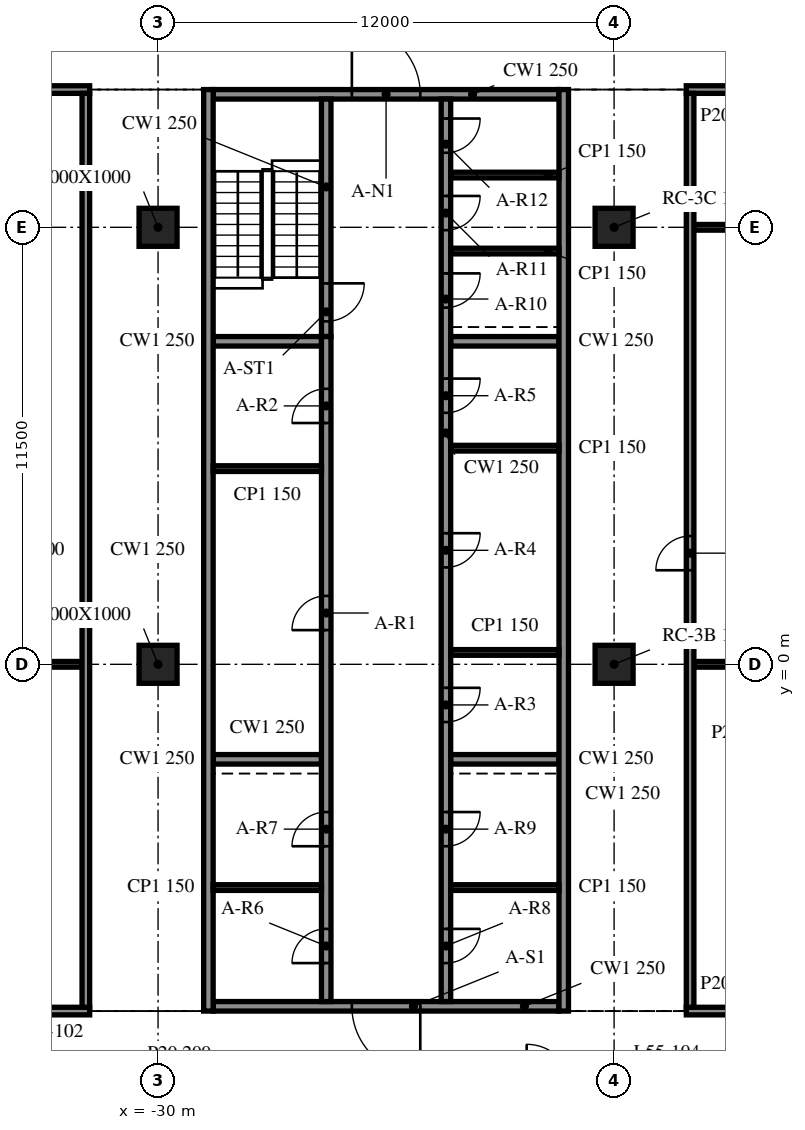
"""IFC4 building model, lengths in metres.
Left out: names, types, materials, properties, quantities, classifications, styles, units other than length and angle.
Written with IfcOpenShell. Run it as: python <this file> out.ifc"""

import sys

from ifc_helpers import new_model, si_unit, direction, frame, frame_2d, origin, origin_2d, place, context, subcontext, project, spatial, rectangle, extrude, element, fill, save


model = new_model("IFC4")
c1 = context("Model", 3, precision=1e-05, world=origin(), true_north=direction((0.0, 1.0)))
c2 = subcontext(c1, "Body", "Model", "MODEL_VIEW")
j1 = project(units=[si_unit("LENGTHUNIT", "METRE"), si_unit("PLANEANGLEUNIT", "RADIAN")], contexts=[c1])
p1 = place(None, origin())
s1 = spatial("IfcSite", under=j1, at=p1, CompositionType="ELEMENT")
p2 = place(p1, origin())
s2 = spatial("IfcBuilding", under=s1, at=p2, CompositionType="ELEMENT")
p3 = place(p2, frame((0.0, 0.0, 228.6)))
s3 = spatial("IfcBuildingStorey", under=s2, at=p3, CompositionType="ELEMENT", Elevation=228.6)
for number, where, z_axis, x_axis in (
    (1, (-30.0, 0.0, -0.34), (0.0, 0.0, 1.0), (1.0, 0.0, 0.0)),
    (2, (-30.0, 11.5, -0.34), (0.0, 0.0, 1.0), (1.0, 0.0, 0.0)),
    (3, (-18.0, 0.0, -0.34), (0.0, 0.0, 1.0), (1.0, 0.0, 0.0)),
    (4, (-18.0, 11.5, -0.34), (0.0, 0.0, 1.0), (1.0, 0.0, 0.0)),
):
    element("IfcColumn", number, at=place(p3, frame(where, z_axis=z_axis, x_axis=x_axis)), inside=s3, PredefinedType="COLUMN", context=c2, shape_type="SweptSolid", body=[
        extrude(rectangle(XDim=1.0, YDim=1.0, at=origin_2d()), origin(), (0.0, 0.0, 1.0), 3.8),
    ])
for number, where, z_axis, x_axis in (
    (5, (-28.675, 15.125, 0.0), (0.0, 0.0, 1.0), (0.0, -1.0, 0.0)),
    (6, (-19.325, -9.125, 0.0), (0.0, 0.0, 1.0), (0.0, 1.0, 0.0)),
):
    element("IfcWall", number, at=place(p3, frame(where, z_axis=z_axis, x_axis=x_axis)), inside=s3, PredefinedType="SOLIDWALL", context=c2, shape_type="SweptSolid", body=[
        extrude(rectangle(XDim=24.25, YDim=0.25, at=frame_2d((12.125, 0.0))), origin(), (0.0, 0.0, 1.0), 3.46),
    ])
p4 = place(p3, frame((-19.45, -9.0, 0.0), z_axis=(0.0, 0.0, 1.0), x_axis=(-1.0, 0.0, 0.0)))
e7 = element("IfcWall", 7, at=p4, inside=s3, PredefinedType="SOLIDWALL", context=c2, shape_type="SweptSolid", body=[
    extrude(rectangle(XDim=9.1, YDim=0.25, at=frame_2d((4.55, 0.0))), origin(), (0.0, 0.0, 1.0), 3.46),
])
p5 = place(p4, frame((3.65, 0.0, 0.0)))
e8 = element("IfcOpeningElement", 8, at=p5, cuts=e7, PredefinedType="OPENING", context=c2, shape_type="SweptSolid", body=[
    extrude(rectangle(XDim=1.8, YDim=2.1, at=frame_2d((0.9, 1.05))), frame((0.0, 0.135, 0.0), z_axis=(0.0, -1.0, 0.0), x_axis=(1.0, 0.0, 0.0)), (0.0, 0.0, 1.0), 0.27),
])
p6 = place(p3, frame((-28.55, 15.0, 0.0), z_axis=(0.0, 0.0, 1.0), x_axis=(1.0, 0.0, 0.0)))
e9 = element("IfcWall", 9, at=p6, inside=s3, PredefinedType="SOLIDWALL", context=c2, shape_type="SweptSolid", body=[
    extrude(rectangle(XDim=9.1, YDim=0.25, at=frame_2d((4.55, 0.0))), origin(), (0.0, 0.0, 1.0), 3.46),
])
p7 = place(p6, frame((3.65, 0.0, 0.0)))
e10 = element("IfcOpeningElement", 10, at=p7, cuts=e9, PredefinedType="OPENING", context=c2, shape_type="SweptSolid", body=[
    extrude(rectangle(XDim=1.8, YDim=2.1, at=frame_2d((0.9, 1.05))), frame((0.0, 0.135, 0.0), z_axis=(0.0, -1.0, 0.0), x_axis=(1.0, 0.0, 0.0)), (0.0, 0.0, 1.0), 0.27),
])
p8 = place(p3, frame((-25.575, -8.875, 0.0), z_axis=(0.0, 0.0, 1.0), x_axis=(0.0, 1.0, 0.0)))
e11 = element("IfcWall", 11, at=p8, inside=s3, PredefinedType="SOLIDWALL", context=c2, shape_type="SweptSolid", body=[
    extrude(rectangle(XDim=17.5, YDim=0.25, at=frame_2d((8.75, 0.0))), origin(), (0.0, 0.0, 1.0), 3.46),
])
p9 = place(p8, frame((9.775, 0.0, 0.0)))
e12 = element("IfcOpeningElement", 12, at=p9, cuts=e11, PredefinedType="OPENING", context=c2, shape_type="SweptSolid", body=[
    extrude(rectangle(XDim=0.9, YDim=2.1, at=frame_2d((0.45, 1.05))), frame((0.0, 0.135, 0.0), z_axis=(0.0, -1.0, 0.0), x_axis=(1.0, 0.0, 0.0)), (0.0, 0.0, 1.0), 0.27),
])
p10 = place(p8, frame((15.225, 0.0, 0.0)))
e13 = element("IfcOpeningElement", 13, at=p10, cuts=e11, PredefinedType="OPENING", context=c2, shape_type="SweptSolid", body=[
    extrude(rectangle(XDim=0.9, YDim=2.1, at=frame_2d((0.45, 1.05))), frame((0.0, 0.135, 0.0), z_axis=(0.0, -1.0, 0.0), x_axis=(1.0, 0.0, 0.0)), (0.0, 0.0, 1.0), 0.27),
])
p11 = place(p8, frame((1.012, 0.0, 0.0)))
e14 = element("IfcOpeningElement", 14, at=p11, cuts=e11, PredefinedType="OPENING", context=c2, shape_type="SweptSolid", body=[
    extrude(rectangle(XDim=0.9, YDim=2.1, at=frame_2d((0.45, 1.05))), frame((0.0, 0.135, 0.0), z_axis=(0.0, -1.0, 0.0), x_axis=(1.0, 0.0, 0.0)), (0.0, 0.0, 1.0), 0.27),
])
p12 = place(p8, frame((4.087, 0.0, 0.0)))
e15 = element("IfcOpeningElement", 15, at=p12, cuts=e11, PredefinedType="OPENING", context=c2, shape_type="SweptSolid", body=[
    extrude(rectangle(XDim=0.9, YDim=2.1, at=frame_2d((0.45, 1.05))), frame((0.0, 0.135, 0.0), z_axis=(0.0, -1.0, 0.0), x_axis=(1.0, 0.0, 0.0)), (0.0, 0.0, 1.0), 0.27),
])
p13 = place(p3, frame((-25.575, 14.875, 0.0), z_axis=(0.0, 0.0, 1.0), x_axis=(0.0, -1.0, 0.0)))
e16 = element("IfcWall", 16, at=p13, inside=s3, PredefinedType="SOLIDWALL", context=c2, shape_type="SweptSolid", body=[
    extrude(rectangle(XDim=6.25, YDim=0.25, at=frame_2d((3.125, 0.0))), origin(), (0.0, 0.0, 1.0), 3.46),
])
p14 = place(p13, frame((4.85, 0.0, 0.0)))
e17 = element("IfcOpeningElement", 17, at=p14, cuts=e16, PredefinedType="OPENING", context=c2, shape_type="SweptSolid", body=[
    extrude(rectangle(XDim=1.0, YDim=2.1, at=frame_2d((0.5, 1.05))), frame((0.0, 0.135, 0.0), z_axis=(0.0, -1.0, 0.0), x_axis=(1.0, 0.0, 0.0)), (0.0, 0.0, 1.0), 0.27),
])
p15 = place(p3, frame((-22.425, 14.875, 0.0), z_axis=(0.0, 0.0, 1.0), x_axis=(0.0, -1.0, 0.0)))
e18 = element("IfcWall", 18, at=p15, inside=s3, PredefinedType="SOLIDWALL", context=c2, shape_type="SweptSolid", body=[
    extrude(rectangle(XDim=23.75, YDim=0.25, at=frame_2d((11.875, 0.0))), origin(), (0.0, 0.0, 1.0), 3.46),
])
p16 = place(p15, frame((15.494, 0.0, 0.0)))
e19 = element("IfcOpeningElement", 19, at=p16, cuts=e18, PredefinedType="OPENING", context=c2, shape_type="SweptSolid", body=[
    extrude(rectangle(XDim=0.9, YDim=2.1, at=frame_2d((0.45, 1.05))), frame((0.0, 0.135, 0.0), z_axis=(0.0, -1.0, 0.0), x_axis=(1.0, 0.0, 0.0)), (0.0, 0.0, 1.0), 0.27),
])
p17 = place(p15, frame((11.425, 0.0, 0.0)))
e20 = element("IfcOpeningElement", 20, at=p17, cuts=e18, PredefinedType="OPENING", context=c2, shape_type="SweptSolid", body=[
    extrude(rectangle(XDim=0.9, YDim=2.1, at=frame_2d((0.45, 1.05))), frame((0.0, 0.135, 0.0), z_axis=(0.0, -1.0, 0.0), x_axis=(1.0, 0.0, 0.0)), (0.0, 0.0, 1.0), 0.27),
])
p18 = place(p15, frame((7.356, 0.0, 0.0)))
e21 = element("IfcOpeningElement", 21, at=p18, cuts=e18, PredefinedType="OPENING", context=c2, shape_type="SweptSolid", body=[
    extrude(rectangle(XDim=0.9, YDim=2.1, at=frame_2d((0.45, 1.05))), frame((0.0, 0.135, 0.0), z_axis=(0.0, -1.0, 0.0), x_axis=(1.0, 0.0, 0.0)), (0.0, 0.0, 1.0), 0.27),
])
p19 = place(p15, frame((21.837, 0.0, 0.0)))
e22 = element("IfcOpeningElement", 22, at=p19, cuts=e18, PredefinedType="OPENING", context=c2, shape_type="SweptSolid", body=[
    extrude(rectangle(XDim=0.9, YDim=2.1, at=frame_2d((0.45, 1.05))), frame((0.0, 0.135, 0.0), z_axis=(0.0, -1.0, 0.0), x_axis=(1.0, 0.0, 0.0)), (0.0, 0.0, 1.0), 0.27),
])
p20 = place(p15, frame((18.762, 0.0, 0.0)))
e23 = element("IfcOpeningElement", 23, at=p20, cuts=e18, PredefinedType="OPENING", context=c2, shape_type="SweptSolid", body=[
    extrude(rectangle(XDim=0.9, YDim=2.1, at=frame_2d((0.45, 1.05))), frame((0.0, 0.135, 0.0), z_axis=(0.0, -1.0, 0.0), x_axis=(1.0, 0.0, 0.0)), (0.0, 0.0, 1.0), 0.27),
])
p21 = place(p15, frame((4.587, 0.0, 0.0)))
e24 = element("IfcOpeningElement", 24, at=p21, cuts=e18, PredefinedType="OPENING", context=c2, shape_type="SweptSolid", body=[
    extrude(rectangle(XDim=0.9, YDim=2.1, at=frame_2d((0.45, 1.05))), frame((0.0, 0.135, 0.0), z_axis=(0.0, -1.0, 0.0), x_axis=(1.0, 0.0, 0.0)), (0.0, 0.0, 1.0), 0.27),
])
p22 = place(p15, frame((2.55, 0.0, 0.0)))
e25 = element("IfcOpeningElement", 25, at=p22, cuts=e18, PredefinedType="OPENING", context=c2, shape_type="SweptSolid", body=[
    extrude(rectangle(XDim=0.9, YDim=2.1, at=frame_2d((0.45, 1.05))), frame((0.0, 0.135, 0.0), z_axis=(0.0, -1.0, 0.0), x_axis=(1.0, 0.0, 0.0)), (0.0, 0.0, 1.0), 0.27),
])
p23 = place(p15, frame((0.512, 0.0, 0.0)))
e26 = element("IfcOpeningElement", 26, at=p23, cuts=e18, PredefinedType="OPENING", context=c2, shape_type="SweptSolid", body=[
    extrude(rectangle(XDim=0.9, YDim=2.1, at=frame_2d((0.45, 1.05))), frame((0.0, 0.135, 0.0), z_axis=(0.0, -1.0, 0.0), x_axis=(1.0, 0.0, 0.0)), (0.0, 0.0, 1.0), 0.27),
])
for number, where, z_axis, x_axis in (
    (27, (-28.55, -2.5, 0.0), (0.0, 0.0, 1.0), (1.0, 0.0, 0.0)),
    (28, (-28.55, 8.5, 0.0), (0.0, 0.0, 1.0), (1.0, 0.0, 0.0)),
    (29, (-22.3, -2.5, 0.0), (0.0, 0.0, 1.0), (1.0, 0.0, 0.0)),
    (30, (-22.3, 8.5, 0.0), (0.0, 0.0, 1.0), (1.0, 0.0, 0.0)),
):
    element("IfcWall", number, at=place(p3, frame(where, z_axis=z_axis, x_axis=x_axis)), inside=s3, PredefinedType="SOLIDWALL", context=c2, shape_type="SweptSolid", body=[
        extrude(rectangle(XDim=2.85, YDim=0.25, at=frame_2d((1.425, 0.0))), origin(), (0.0, 0.0, 1.0), 3.46),
    ])
for number, where, z_axis, x_axis in (
    (31, (-28.55, 5.15, 0.0), (0.0, 0.0, 1.0), (1.0, 0.0, 0.0)),
    (32, (-22.3, 0.312, 0.0), (0.0, 0.0, 1.0), (1.0, 0.0, 0.0)),
    (33, (-22.3, 5.688, 0.0), (0.0, 0.0, 1.0), (1.0, 0.0, 0.0)),
    (34, (-28.55, -5.875, 0.0), (0.0, 0.0, 1.0), (1.0, 0.0, 0.0)),
    (35, (-22.3, -5.875, 0.0), (0.0, 0.0, 1.0), (1.0, 0.0, 0.0)),
    (36, (-22.3, 10.875, 0.0), (0.0, 0.0, 1.0), (1.0, 0.0, 0.0)),
    (37, (-22.3, 12.875, 0.0), (0.0, 0.0, 1.0), (1.0, 0.0, 0.0)),
):
    element("IfcWall", number, at=place(p3, frame(where, z_axis=z_axis, x_axis=x_axis)), inside=s3, PredefinedType="PARTITIONING", context=c2, shape_type="SweptSolid", body=[
        extrude(rectangle(XDim=2.85, YDim=0.15, at=frame_2d((1.425, 0.0))), origin(), (0.0, 0.0, 1.0), 3.46),
    ])
p24 = place(p3, frame((-41.975, -9.125, 0.0), z_axis=(0.0, 0.0, 1.0), x_axis=(1.0, 0.0, 0.0)))
e38 = element("IfcWall", 38, at=p24, inside=s3, PredefinedType="PARTITIONING", context=c2, shape_type="SweptSolid", body=[
    extrude(rectangle(XDim=10.175, YDim=0.2, at=frame_2d((5.087, 0.0))), origin(), (0.0, 0.0, 1.0), 3.46),
])
p25 = place(p24, frame((4.5, 0.0, 0.0)))
e39 = element("IfcOpeningElement", 39, at=p25, cuts=e38, PredefinedType="OPENING", context=c2, shape_type="SweptSolid", body=[
    extrude(rectangle(XDim=1.2, YDim=2.1, at=frame_2d((0.6, 1.05))), frame((0.0, 0.11, 0.0), z_axis=(0.0, -1.0, 0.0), x_axis=(1.0, 0.0, 0.0)), (0.0, 0.0, 1.0), 0.22),
])
p26 = place(p3, frame((-16.1, -9.125, 0.0), z_axis=(0.0, 0.0, 1.0), x_axis=(1.0, 0.0, 0.0)))
e40 = element("IfcWall", 40, at=p26, inside=s3, PredefinedType="PARTITIONING", context=c2, shape_type="SweptSolid", body=[
    extrude(rectangle(XDim=8.1, YDim=0.2, at=frame_2d((4.05, 0.0))), origin(), (0.0, 0.0, 1.0), 3.46),
])
p27 = place(p26, frame((3.5, 0.0, 0.0)))
e41 = element("IfcOpeningElement", 41, at=p27, cuts=e40, PredefinedType="OPENING", context=c2, shape_type="SweptSolid", body=[
    extrude(rectangle(XDim=0.9, YDim=2.1, at=frame_2d((0.45, 1.05))), frame((0.0, 0.11, 0.0), z_axis=(0.0, -1.0, 0.0), x_axis=(1.0, 0.0, 0.0)), (0.0, 0.0, 1.0), 0.22),
])
p28 = place(p3, frame((-41.5, 0.0, 0.0), z_axis=(0.0, 0.0, 1.0), x_axis=(1.0, 0.0, 0.0)))
e42 = element("IfcWall", 42, at=p28, inside=s3, PredefinedType="PARTITIONING", context=c2, shape_type="SweptSolid", body=[
    extrude(rectangle(XDim=9.5, YDim=0.15, at=frame_2d((4.75, 0.0))), origin(), (0.0, 0.0, 1.0), 3.46),
])
for number, where, z_axis, x_axis in (
    (43, (-15.9, 0.0, 0.0), (0.0, 0.0, 1.0), (1.0, 0.0, 0.0)),
    (44, (-15.9, 11.5, 0.0), (0.0, 0.0, 1.0), (1.0, 0.0, 0.0)),
):
    element("IfcWall", number, at=place(p3, frame(where, z_axis=z_axis, x_axis=x_axis)), inside=s3, PredefinedType="PARTITIONING", context=c2, shape_type="SweptSolid", body=[
        extrude(rectangle(XDim=7.7, YDim=0.15, at=frame_2d((3.85, 0.0))), origin(), (0.0, 0.0, 1.0), 3.46),
    ])
p29 = place(p3, frame((-41.975, 15.125, 0.0), z_axis=(0.0, 0.0, 1.0), x_axis=(1.0, 0.0, 0.0)))
e45 = element("IfcWall", 45, at=p29, inside=s3, PredefinedType="PARTITIONING", context=c2, shape_type="SweptSolid", body=[
    extrude(rectangle(XDim=10.175, YDim=0.2, at=frame_2d((5.087, 0.0))), origin(), (0.0, 0.0, 1.0), 3.46),
])
p30 = place(p29, frame((4.5, 0.0, 0.0)))
e46 = element("IfcOpeningElement", 46, at=p30, cuts=e45, PredefinedType="OPENING", context=c2, shape_type="SweptSolid", body=[
    extrude(rectangle(XDim=1.2, YDim=2.1, at=frame_2d((0.6, 1.05))), frame((0.0, 0.11, 0.0), z_axis=(0.0, -1.0, 0.0), x_axis=(1.0, 0.0, 0.0)), (0.0, 0.0, 1.0), 0.22),
])
p31 = place(p3, frame((-16.1, 15.125, 0.0), z_axis=(0.0, 0.0, 1.0), x_axis=(1.0, 0.0, 0.0)))
e47 = element("IfcWall", 47, at=p31, inside=s3, PredefinedType="PARTITIONING", context=c2, shape_type="SweptSolid", body=[
    extrude(rectangle(XDim=8.1, YDim=0.2, at=frame_2d((4.05, 0.0))), origin(), (0.0, 0.0, 1.0), 3.46),
])
p32 = place(p31, frame((3.5, 0.0, 0.0)))
e48 = element("IfcOpeningElement", 48, at=p32, cuts=e47, PredefinedType="OPENING", context=c2, shape_type="SweptSolid", body=[
    extrude(rectangle(XDim=1.0, YDim=2.1, at=frame_2d((0.5, 1.05))), frame((0.0, 0.11, 0.0), z_axis=(0.0, -1.0, 0.0), x_axis=(1.0, 0.0, 0.0)), (0.0, 0.0, 1.0), 0.22),
])
p33 = place(p3, frame((-31.9, -9.025, 0.0), z_axis=(0.0, 0.0, 1.0), x_axis=(0.0, 1.0, 0.0)))
e49 = element("IfcWall", 49, at=p33, inside=s3, PredefinedType="PARTITIONING", context=c2, shape_type="SweptSolid", body=[
    extrude(rectangle(XDim=24.05, YDim=0.2, at=frame_2d((12.025, 0.0))), origin(), (0.0, 0.0, 1.0), 3.46),
])
p34 = place(p3, frame((-16.0, -9.025, 0.0), z_axis=(0.0, 0.0, 1.0), x_axis=(0.0, 1.0, 0.0)))
e50 = element("IfcWall", 50, at=p34, inside=s3, PredefinedType="PARTITIONING", context=c2, shape_type="SweptSolid", body=[
    extrude(rectangle(XDim=24.05, YDim=0.2, at=frame_2d((12.025, 0.0))), origin(), (0.0, 0.0, 1.0), 3.46),
])
p35 = place(p34, frame((11.5, 0.0, 0.0)))
e51 = element("IfcOpeningElement", 51, at=p35, cuts=e50, PredefinedType="OPENING", context=c2, shape_type="SweptSolid", body=[
    extrude(rectangle(XDim=0.9, YDim=2.1, at=frame_2d((0.45, 1.05))), frame((0.0, 0.11, 0.0), z_axis=(0.0, -1.0, 0.0), x_axis=(1.0, 0.0, 0.0)), (0.0, 0.0, 1.0), 0.22),
])
p36 = place(p5, origin())
e52 = element("IfcDoor", 52, at=p36, inside=s3, OperationType="DOUBLE_DOOR_SINGLE_SWING", PredefinedType="DOOR", context=c2, shape_type="SweptSolid", body=[
    extrude(rectangle(XDim=1.8, YDim=2.1, at=frame_2d((0.9, 1.05))), frame((0.0, 0.025, 0.0), z_axis=(0.0, -1.0, 0.0), x_axis=(1.0, 0.0, 0.0)), (0.0, 0.0, 1.0), 0.05),
])
fill(e8, e52)
p37 = place(p7, origin())
e53 = element("IfcDoor", 53, at=p37, inside=s3, OperationType="DOUBLE_DOOR_SINGLE_SWING", PredefinedType="DOOR", context=c2, shape_type="SweptSolid", body=[
    extrude(rectangle(XDim=1.8, YDim=2.1, at=frame_2d((0.9, 1.05))), frame((0.0, 0.025, 0.0), z_axis=(0.0, -1.0, 0.0), x_axis=(1.0, 0.0, 0.0)), (0.0, 0.0, 1.0), 0.05),
])
fill(e10, e53)
p38 = place(p9, origin())
e54 = element("IfcDoor", 54, at=p38, inside=s3, OperationType="SINGLE_SWING_LEFT", PredefinedType="DOOR", context=c2, shape_type="SweptSolid", body=[
    extrude(rectangle(XDim=0.9, YDim=2.1, at=frame_2d((0.45, 1.05))), frame((0.0, 0.025, 0.0), z_axis=(0.0, -1.0, 0.0), x_axis=(1.0, 0.0, 0.0)), (0.0, 0.0, 1.0), 0.05),
])
fill(e12, e54)
p39 = place(p10, origin())
e55 = element("IfcDoor", 55, at=p39, inside=s3, OperationType="SINGLE_SWING_RIGHT", PredefinedType="DOOR", context=c2, shape_type="SweptSolid", body=[
    extrude(rectangle(XDim=0.9, YDim=2.1, at=frame_2d((0.45, 1.05))), frame((0.0, 0.025, 0.0), z_axis=(0.0, -1.0, 0.0), x_axis=(1.0, 0.0, 0.0)), (0.0, 0.0, 1.0), 0.05),
])
fill(e13, e55)
p40 = place(p16, origin())
e56 = element("IfcDoor", 56, at=p40, inside=s3, OperationType="SINGLE_SWING_LEFT", PredefinedType="DOOR", context=c2, shape_type="SweptSolid", body=[
    extrude(rectangle(XDim=0.9, YDim=2.1, at=frame_2d((0.45, 1.05))), frame((0.0, 0.025, 0.0), z_axis=(0.0, -1.0, 0.0), x_axis=(1.0, 0.0, 0.0)), (0.0, 0.0, 1.0), 0.05),
])
fill(e19, e56)
p41 = place(p17, origin())
e57 = element("IfcDoor", 57, at=p41, inside=s3, OperationType="SINGLE_SWING_RIGHT", PredefinedType="DOOR", context=c2, shape_type="SweptSolid", body=[
    extrude(rectangle(XDim=0.9, YDim=2.1, at=frame_2d((0.45, 1.05))), frame((0.0, 0.025, 0.0), z_axis=(0.0, -1.0, 0.0), x_axis=(1.0, 0.0, 0.0)), (0.0, 0.0, 1.0), 0.05),
])
fill(e20, e57)
p42 = place(p18, origin())
e58 = element("IfcDoor", 58, at=p42, inside=s3, OperationType="SINGLE_SWING_LEFT", PredefinedType="DOOR", context=c2, shape_type="SweptSolid", body=[
    extrude(rectangle(XDim=0.9, YDim=2.1, at=frame_2d((0.45, 1.05))), frame((0.0, 0.025, 0.0), z_axis=(0.0, -1.0, 0.0), x_axis=(1.0, 0.0, 0.0)), (0.0, 0.0, 1.0), 0.05),
])
fill(e21, e58)
p43 = place(p11, origin())
e59 = element("IfcDoor", 59, at=p43, inside=s3, OperationType="SINGLE_SWING_RIGHT", PredefinedType="DOOR", context=c2, shape_type="SweptSolid", body=[
    extrude(rectangle(XDim=0.9, YDim=2.1, at=frame_2d((0.45, 1.05))), frame((0.0, 0.025, 0.0), z_axis=(0.0, -1.0, 0.0), x_axis=(1.0, 0.0, 0.0)), (0.0, 0.0, 1.0), 0.05),
])
fill(e14, e59)
p44 = place(p12, origin())
e60 = element("IfcDoor", 60, at=p44, inside=s3, OperationType="SINGLE_SWING_LEFT", PredefinedType="DOOR", context=c2, shape_type="SweptSolid", body=[
    extrude(rectangle(XDim=0.9, YDim=2.1, at=frame_2d((0.45, 1.05))), frame((0.0, 0.025, 0.0), z_axis=(0.0, -1.0, 0.0), x_axis=(1.0, 0.0, 0.0)), (0.0, 0.0, 1.0), 0.05),
])
fill(e15, e60)
p45 = place(p19, origin())
e61 = element("IfcDoor", 61, at=p45, inside=s3, OperationType="SINGLE_SWING_RIGHT", PredefinedType="DOOR", context=c2, shape_type="SweptSolid", body=[
    extrude(rectangle(XDim=0.9, YDim=2.1, at=frame_2d((0.45, 1.05))), frame((0.0, 0.025, 0.0), z_axis=(0.0, -1.0, 0.0), x_axis=(1.0, 0.0, 0.0)), (0.0, 0.0, 1.0), 0.05),
])
fill(e22, e61)
p46 = place(p20, origin())
e62 = element("IfcDoor", 62, at=p46, inside=s3, OperationType="SINGLE_SWING_LEFT", PredefinedType="DOOR", context=c2, shape_type="SweptSolid", body=[
    extrude(rectangle(XDim=0.9, YDim=2.1, at=frame_2d((0.45, 1.05))), frame((0.0, 0.025, 0.0), z_axis=(0.0, -1.0, 0.0), x_axis=(1.0, 0.0, 0.0)), (0.0, 0.0, 1.0), 0.05),
])
fill(e23, e62)
p47 = place(p21, origin())
e63 = element("IfcDoor", 63, at=p47, inside=s3, OperationType="SINGLE_SWING_RIGHT", PredefinedType="DOOR", context=c2, shape_type="SweptSolid", body=[
    extrude(rectangle(XDim=0.9, YDim=2.1, at=frame_2d((0.45, 1.05))), frame((0.0, 0.025, 0.0), z_axis=(0.0, -1.0, 0.0), x_axis=(1.0, 0.0, 0.0)), (0.0, 0.0, 1.0), 0.05),
])
fill(e24, e63)
p48 = place(p22, origin())
e64 = element("IfcDoor", 64, at=p48, inside=s3, OperationType="SINGLE_SWING_LEFT", PredefinedType="DOOR", context=c2, shape_type="SweptSolid", body=[
    extrude(rectangle(XDim=0.9, YDim=2.1, at=frame_2d((0.45, 1.05))), frame((0.0, 0.025, 0.0), z_axis=(0.0, -1.0, 0.0), x_axis=(1.0, 0.0, 0.0)), (0.0, 0.0, 1.0), 0.05),
])
fill(e25, e64)
p49 = place(p23, origin())
e65 = element("IfcDoor", 65, at=p49, inside=s3, OperationType="SINGLE_SWING_RIGHT", PredefinedType="DOOR", context=c2, shape_type="SweptSolid", body=[
    extrude(rectangle(XDim=0.9, YDim=2.1, at=frame_2d((0.45, 1.05))), frame((0.0, 0.025, 0.0), z_axis=(0.0, -1.0, 0.0), x_axis=(1.0, 0.0, 0.0)), (0.0, 0.0, 1.0), 0.05),
])
fill(e26, e65)
p50 = place(p14, origin())
e66 = element("IfcDoor", 66, at=p50, inside=s3, OperationType="SINGLE_SWING_LEFT", PredefinedType="DOOR", context=c2, shape_type="SweptSolid", body=[
    extrude(rectangle(XDim=1.0, YDim=2.1, at=frame_2d((0.5, 1.05))), frame((0.0, 0.025, 0.0), z_axis=(0.0, -1.0, 0.0), x_axis=(1.0, 0.0, 0.0)), (0.0, 0.0, 1.0), 0.05),
])
fill(e17, e66)
p51 = place(p35, origin())
e67 = element("IfcDoor", 67, at=p51, inside=s3, OperationType="SINGLE_SWING_RIGHT", PredefinedType="DOOR", context=c2, shape_type="SweptSolid", body=[
    extrude(rectangle(XDim=0.9, YDim=2.1, at=frame_2d((0.45, 1.05))), frame((0.0, 0.025, 0.0), z_axis=(0.0, -1.0, 0.0), x_axis=(1.0, 0.0, 0.0)), (0.0, 0.0, 1.0), 0.05),
])
fill(e51, e67)
save(model, sys.argv[1])
